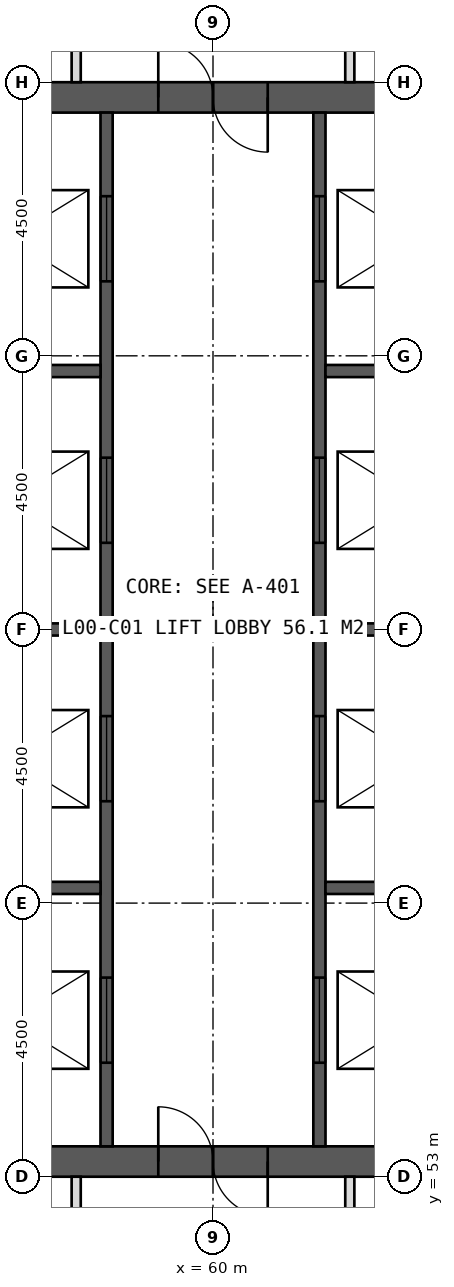
"""IFC4 building model, lengths in metres.
Left out: names, types, materials, properties, quantities, classifications, styles, units other than length and angle.
Written with IfcOpenShell. Run it as: python <this file> out.ifc"""

import sys

from ifc_helpers import new_model, si_unit, direction, frame, frame_2d, origin, place, context, subcontext, project, spatial, rectangle, extrude, element, fill, save


model = new_model("IFC4")
c1 = context("Model", 3, precision=1e-05, world=origin(), true_north=direction((0.0, 1.0)))
c2 = subcontext(c1, "Body", "Model", "MODEL_VIEW")
j1 = project(units=[si_unit("LENGTHUNIT", "METRE"), si_unit("PLANEANGLEUNIT", "RADIAN")], contexts=[c1])
p1 = place(None, origin())
s1 = spatial("IfcSite", under=j1, at=p1, CompositionType="ELEMENT")
p2 = place(p1, origin())
s2 = spatial("IfcBuilding", under=s1, at=p2, CompositionType="ELEMENT")
p3 = place(p2, origin())
s3 = spatial("IfcBuildingStorey", under=s2, at=p3, CompositionType="ELEMENT", Elevation=0.0)
p4 = place(p3, frame((51.0, 70.75, 0.0), z_axis=(0.0, 0.0, 1.0), x_axis=(1.0, 0.0, 0.0)))
e1 = element("IfcWall", 1, at=p4, inside=s3, PredefinedType="SHEAR", context=c2, shape_type="SweptSolid", body=[
    extrude(rectangle(XDim=18.0, YDim=0.5, at=frame_2d((9.0, 0.0))), origin(), (0.0, 0.0, 1.0), 6.0),
])
p5 = place(p4, frame((8.1, 0.0, 0.0)))
e2 = element("IfcOpeningElement", 2, at=p5, cuts=e1, PredefinedType="OPENING", context=c2, shape_type="SweptSolid", body=[
    extrude(rectangle(XDim=1.8, YDim=2.2, at=frame_2d((0.9, 1.1))), frame((0.0, 0.26, 0.0), z_axis=(0.0, -1.0, 0.0), x_axis=(1.0, 0.0, 0.0)), (0.0, 0.0, 1.0), 0.52),
])
p6 = place(p3, frame((51.0, 53.25, 0.0), z_axis=(0.0, 0.0, 1.0), x_axis=(1.0, 0.0, 0.0)))
e3 = element("IfcWall", 3, at=p6, inside=s3, PredefinedType="SHEAR", context=c2, shape_type="SweptSolid", body=[
    extrude(rectangle(XDim=18.0, YDim=0.5, at=frame_2d((9.0, 0.0))), origin(), (0.0, 0.0, 1.0), 6.0),
])
p7 = place(p6, frame((8.1, 0.0, 0.0)))
e4 = element("IfcOpeningElement", 4, at=p7, cuts=e3, PredefinedType="OPENING", context=c2, shape_type="SweptSolid", body=[
    extrude(rectangle(XDim=1.8, YDim=2.2, at=frame_2d((0.9, 1.1))), frame((0.0, 0.26, 0.0), z_axis=(0.0, -1.0, 0.0), x_axis=(1.0, 0.0, 0.0)), (0.0, 0.0, 1.0), 0.52),
])
p8 = place(p3, frame((58.25, 53.5, 0.0), z_axis=(0.0, 0.0, 1.0), x_axis=(0.0, 1.0, 0.0)))
e5 = element("IfcWall", 5, at=p8, inside=s3, PredefinedType="SHEAR", context=c2, shape_type="SweptSolid", body=[
    extrude(rectangle(XDim=17.0, YDim=0.2, at=frame_2d((8.5, 0.0))), origin(), (0.0, 0.0, 1.0), 6.0),
])
p9 = place(p8, frame((1.375, 0.0, 0.0)))
e6 = element("IfcOpeningElement", 6, at=p9, cuts=e5, PredefinedType="OPENING", context=c2, shape_type="SweptSolid", body=[
    extrude(rectangle(XDim=1.4, YDim=2.2, at=frame_2d((0.7, 1.1))), frame((0.0, 0.11, 0.0), z_axis=(0.0, -1.0, 0.0), x_axis=(1.0, 0.0, 0.0)), (0.0, 0.0, 1.0), 0.22),
])
p10 = place(p8, frame((5.675, 0.0, 0.0)))
e7 = element("IfcOpeningElement", 7, at=p10, cuts=e5, PredefinedType="OPENING", context=c2, shape_type="SweptSolid", body=[
    extrude(rectangle(XDim=1.4, YDim=2.2, at=frame_2d((0.7, 1.1))), frame((0.0, 0.11, 0.0), z_axis=(0.0, -1.0, 0.0), x_axis=(1.0, 0.0, 0.0)), (0.0, 0.0, 1.0), 0.22),
])
p11 = place(p8, frame((9.925, 0.0, 0.0)))
e8 = element("IfcOpeningElement", 8, at=p11, cuts=e5, PredefinedType="OPENING", context=c2, shape_type="SweptSolid", body=[
    extrude(rectangle(XDim=1.4, YDim=2.2, at=frame_2d((0.7, 1.1))), frame((0.0, 0.11, 0.0), z_axis=(0.0, -1.0, 0.0), x_axis=(1.0, 0.0, 0.0)), (0.0, 0.0, 1.0), 0.22),
])
p12 = place(p8, frame((14.225, 0.0, 0.0)))
e9 = element("IfcOpeningElement", 9, at=p12, cuts=e5, PredefinedType="OPENING", context=c2, shape_type="SweptSolid", body=[
    extrude(rectangle(XDim=1.4, YDim=2.2, at=frame_2d((0.7, 1.1))), frame((0.0, 0.11, 0.0), z_axis=(0.0, -1.0, 0.0), x_axis=(1.0, 0.0, 0.0)), (0.0, 0.0, 1.0), 0.22),
])
p13 = place(p3, frame((61.75, 53.5, 0.0), z_axis=(0.0, 0.0, 1.0), x_axis=(0.0, 1.0, 0.0)))
e10 = element("IfcWall", 10, at=p13, inside=s3, PredefinedType="SHEAR", context=c2, shape_type="SweptSolid", body=[
    extrude(rectangle(XDim=17.0, YDim=0.2, at=frame_2d((8.5, 0.0))), origin(), (0.0, 0.0, 1.0), 6.0),
])
p14 = place(p13, frame((1.375, 0.0, 0.0)))
e11 = element("IfcOpeningElement", 11, at=p14, cuts=e10, PredefinedType="OPENING", context=c2, shape_type="SweptSolid", body=[
    extrude(rectangle(XDim=1.4, YDim=2.2, at=frame_2d((0.7, 1.1))), frame((0.0, 0.11, 0.0), z_axis=(0.0, -1.0, 0.0), x_axis=(1.0, 0.0, 0.0)), (0.0, 0.0, 1.0), 0.22),
])
p15 = place(p13, frame((5.675, 0.0, 0.0)))
e12 = element("IfcOpeningElement", 12, at=p15, cuts=e10, PredefinedType="OPENING", context=c2, shape_type="SweptSolid", body=[
    extrude(rectangle(XDim=1.4, YDim=2.2, at=frame_2d((0.7, 1.1))), frame((0.0, 0.11, 0.0), z_axis=(0.0, -1.0, 0.0), x_axis=(1.0, 0.0, 0.0)), (0.0, 0.0, 1.0), 0.22),
])
p16 = place(p13, frame((9.925, 0.0, 0.0)))
e13 = element("IfcOpeningElement", 13, at=p16, cuts=e10, PredefinedType="OPENING", context=c2, shape_type="SweptSolid", body=[
    extrude(rectangle(XDim=1.4, YDim=2.2, at=frame_2d((0.7, 1.1))), frame((0.0, 0.11, 0.0), z_axis=(0.0, -1.0, 0.0), x_axis=(1.0, 0.0, 0.0)), (0.0, 0.0, 1.0), 0.22),
])
p17 = place(p13, frame((14.225, 0.0, 0.0)))
e14 = element("IfcOpeningElement", 14, at=p17, cuts=e10, PredefinedType="OPENING", context=c2, shape_type="SweptSolid", body=[
    extrude(rectangle(XDim=1.4, YDim=2.2, at=frame_2d((0.7, 1.1))), frame((0.0, 0.11, 0.0), z_axis=(0.0, -1.0, 0.0), x_axis=(1.0, 0.0, 0.0)), (0.0, 0.0, 1.0), 0.22),
])
for number, where, z_axis, x_axis in (
    (15, (55.1, 57.75, 0.0), (0.0, 0.0, 1.0), (1.0, 0.0, 0.0)),
    (16, (61.85, 57.75, 0.0), (0.0, 0.0, 1.0), (1.0, 0.0, 0.0)),
    (17, (55.1, 62.0, 0.0), (0.0, 0.0, 1.0), (1.0, 0.0, 0.0)),
    (18, (61.85, 62.0, 0.0), (0.0, 0.0, 1.0), (1.0, 0.0, 0.0)),
    (19, (55.1, 66.25, 0.0), (0.0, 0.0, 1.0), (1.0, 0.0, 0.0)),
    (20, (61.85, 66.25, 0.0), (0.0, 0.0, 1.0), (1.0, 0.0, 0.0)),
):
    element("IfcWall", number, at=place(p3, frame(where, z_axis=z_axis, x_axis=x_axis)), inside=s3, PredefinedType="SHEAR", context=c2, shape_type="SweptSolid", body=[
        extrude(rectangle(XDim=3.05, YDim=0.2, at=frame_2d((1.525, 0.0))), origin(), (0.0, 0.0, 1.0), 6.0),
    ])
for number, where, z_axis, x_axis in (
    (21, (57.75, 71.0, 0.0), (0.0, 0.0, 1.0), (0.0, 1.0, 0.0)),
    (22, (62.25, 71.0, 0.0), (0.0, 0.0, 1.0), (0.0, 1.0, 0.0)),
    (23, (62.25, 53.0, 0.0), (0.0, 0.0, 1.0), (0.0, -1.0, 0.0)),
    (24, (57.75, 53.0, 0.0), (0.0, 0.0, 1.0), (0.0, -1.0, 0.0)),
):
    element("IfcWall", number, at=place(p3, frame(where, z_axis=z_axis, x_axis=x_axis)), inside=s3, PredefinedType="PARTITIONING", context=c2, shape_type="SweptSolid", body=[
        extrude(rectangle(XDim=7.8, YDim=0.15, at=frame_2d((3.9, 0.0))), origin(), (0.0, 0.0, 1.0), 5.7),
    ])
p18 = place(p5, origin())
e25 = element("IfcDoor", 25, at=p18, inside=s3, OperationType="DOUBLE_DOOR_SINGLE_SWING", PredefinedType="DOOR", context=c2, shape_type="SweptSolid", body=[
    extrude(rectangle(XDim=1.8, YDim=2.2, at=frame_2d((0.9, 1.1))), frame((0.0, 0.025, 0.0), z_axis=(0.0, -1.0, 0.0), x_axis=(1.0, 0.0, 0.0)), (0.0, 0.0, 1.0), 0.05),
])
fill(e2, e25)
p19 = place(p7, origin())
e26 = element("IfcDoor", 26, at=p19, inside=s3, OperationType="DOUBLE_DOOR_SINGLE_SWING", PredefinedType="DOOR", context=c2, shape_type="SweptSolid", body=[
    extrude(rectangle(XDim=1.8, YDim=2.2, at=frame_2d((0.9, 1.1))), frame((0.0, 0.025, 0.0), z_axis=(0.0, -1.0, 0.0), x_axis=(1.0, 0.0, 0.0)), (0.0, 0.0, 1.0), 0.05),
])
fill(e4, e26)
p20 = place(p9, origin())
e27 = element("IfcDoor", 27, at=p20, inside=s3, OperationType="SLIDING_TO_LEFT", PredefinedType="DOOR", context=c2, shape_type="SweptSolid", body=[
    extrude(rectangle(XDim=1.4, YDim=2.2, at=frame_2d((0.7, 1.1))), frame((0.0, 0.025, 0.0), z_axis=(0.0, -1.0, 0.0), x_axis=(1.0, 0.0, 0.0)), (0.0, 0.0, 1.0), 0.05),
])
fill(e6, e27)
p21 = place(p14, origin())
e28 = element("IfcDoor", 28, at=p21, inside=s3, OperationType="SLIDING_TO_LEFT", PredefinedType="DOOR", context=c2, shape_type="SweptSolid", body=[
    extrude(rectangle(XDim=1.4, YDim=2.2, at=frame_2d((0.7, 1.1))), frame((0.0, 0.025, 0.0), z_axis=(0.0, -1.0, 0.0), x_axis=(1.0, 0.0, 0.0)), (0.0, 0.0, 1.0), 0.05),
])
fill(e11, e28)
p22 = place(p10, origin())
e29 = element("IfcDoor", 29, at=p22, inside=s3, OperationType="SLIDING_TO_LEFT", PredefinedType="DOOR", context=c2, shape_type="SweptSolid", body=[
    extrude(rectangle(XDim=1.4, YDim=2.2, at=frame_2d((0.7, 1.1))), frame((0.0, 0.025, 0.0), z_axis=(0.0, -1.0, 0.0), x_axis=(1.0, 0.0, 0.0)), (0.0, 0.0, 1.0), 0.05),
])
fill(e7, e29)
p23 = place(p15, origin())
e30 = element("IfcDoor", 30, at=p23, inside=s3, OperationType="SLIDING_TO_LEFT", PredefinedType="DOOR", context=c2, shape_type="SweptSolid", body=[
    extrude(rectangle(XDim=1.4, YDim=2.2, at=frame_2d((0.7, 1.1))), frame((0.0, 0.025, 0.0), z_axis=(0.0, -1.0, 0.0), x_axis=(1.0, 0.0, 0.0)), (0.0, 0.0, 1.0), 0.05),
])
fill(e12, e30)
p24 = place(p11, origin())
e31 = element("IfcDoor", 31, at=p24, inside=s3, OperationType="SLIDING_TO_LEFT", PredefinedType="DOOR", context=c2, shape_type="SweptSolid", body=[
    extrude(rectangle(XDim=1.4, YDim=2.2, at=frame_2d((0.7, 1.1))), frame((0.0, 0.025, 0.0), z_axis=(0.0, -1.0, 0.0), x_axis=(1.0, 0.0, 0.0)), (0.0, 0.0, 1.0), 0.05),
])
fill(e8, e31)
p25 = place(p16, origin())
e32 = element("IfcDoor", 32, at=p25, inside=s3, OperationType="SLIDING_TO_LEFT", PredefinedType="DOOR", context=c2, shape_type="SweptSolid", body=[
    extrude(rectangle(XDim=1.4, YDim=2.2, at=frame_2d((0.7, 1.1))), frame((0.0, 0.025, 0.0), z_axis=(0.0, -1.0, 0.0), x_axis=(1.0, 0.0, 0.0)), (0.0, 0.0, 1.0), 0.05),
])
fill(e13, e32)
p26 = place(p12, origin())
e33 = element("IfcDoor", 33, at=p26, inside=s3, OperationType="SLIDING_TO_LEFT", PredefinedType="DOOR", context=c2, shape_type="SweptSolid", body=[
    extrude(rectangle(XDim=1.4, YDim=2.2, at=frame_2d((0.7, 1.1))), frame((0.0, 0.025, 0.0), z_axis=(0.0, -1.0, 0.0), x_axis=(1.0, 0.0, 0.0)), (0.0, 0.0, 1.0), 0.05),
])
fill(e9, e33)
p27 = place(p17, origin())
e34 = element("IfcDoor", 34, at=p27, inside=s3, OperationType="SLIDING_TO_LEFT", PredefinedType="DOOR", context=c2, shape_type="SweptSolid", body=[
    extrude(rectangle(XDim=1.4, YDim=2.2, at=frame_2d((0.7, 1.1))), frame((0.0, 0.025, 0.0), z_axis=(0.0, -1.0, 0.0), x_axis=(1.0, 0.0, 0.0)), (0.0, 0.0, 1.0), 0.05),
])
fill(e14, e34)
save(model, sys.argv[1])
